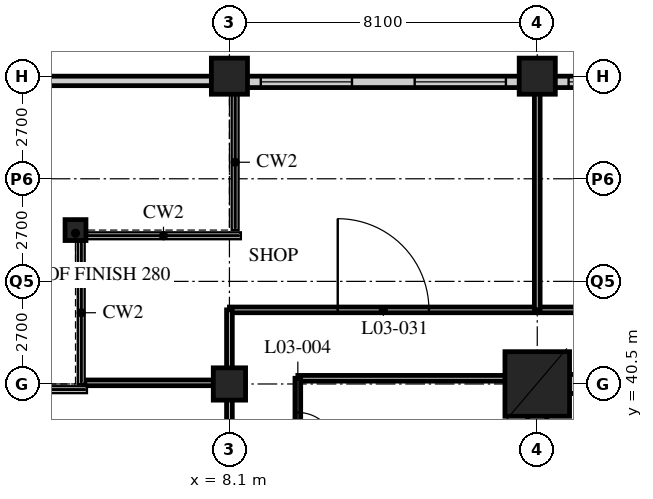
"""IFC4 building model, lengths in metres.
Left out: names, types, materials, properties, quantities, classifications, styles, units other than length and angle.
Written with IfcOpenShell. Run it as: python <this file> out.ifc"""

import sys

from ifc_helpers import new_model, si_unit, direction, frame, frame_2d, origin, origin_2d, place, context, subcontext, project, spatial, rectangle, hollow_rectangle, extrude, element, fill, save


model = new_model("IFC4")
c1 = context("Model", 3, precision=1e-05, world=origin(), true_north=direction((0.0, 1.0)))
c2 = subcontext(c1, "Body", "Model", "MODEL_VIEW")
j1 = project(units=[si_unit("LENGTHUNIT", "METRE"), si_unit("PLANEANGLEUNIT", "RADIAN")], contexts=[c1])
p1 = place(None, origin())
s1 = spatial("IfcSite", under=j1, at=p1, CompositionType="ELEMENT")
p2 = place(p1, origin())
s2 = spatial("IfcBuilding", under=s1, at=p2, CompositionType="ELEMENT")
p3 = place(p2, frame((0.0, 0.0, 16.8)))
s3 = spatial("IfcBuildingStorey", under=s2, at=p3, CompositionType="ELEMENT", Elevation=16.8)
p4 = place(p3, frame((4.05, 44.55, 0.0), z_axis=(0.0, 0.0, 1.0), x_axis=(1.0, 0.0, 0.0)))
e1 = element("IfcColumn", 1, at=p4, inside=s3, PredefinedType="COLUMN", context=c2, shape_type="SweptSolid", body=[
    extrude(hollow_rectangle(XDim=0.55, YDim=0.55, WallThickness=0.05, at=origin_2d()), origin(), (0.0, 0.0, 1.0), 5.4),
])
p5 = place(p3, frame((8.1, 40.5, 0.0), z_axis=(0.0, 0.0, 1.0), x_axis=(1.0, 0.0, 0.0)))
e2 = element("IfcColumn", 2, at=p5, inside=s3, PredefinedType="COLUMN", context=c2, shape_type="SweptSolid", body=[
    extrude(hollow_rectangle(XDim=0.85, YDim=0.85, WallThickness=0.085, at=origin_2d()), origin(), (0.0, 0.0, 1.0), 5.4),
])
p6 = place(p3, frame((8.1, 48.6, 0.0), z_axis=(0.0, 0.0, 1.0), x_axis=(1.0, 0.0, 0.0)))
e3 = element("IfcColumn", 3, at=p6, inside=s3, PredefinedType="COLUMN", context=c2, shape_type="SweptSolid", body=[
    extrude(hollow_rectangle(XDim=0.95, YDim=0.95, WallThickness=0.1, at=origin_2d()), origin(), (0.0, 0.0, 1.0), 5.4),
])
p7 = place(p3, frame((16.2, 40.5, 0.0), z_axis=(0.0, 0.0, 1.0), x_axis=(1.0, 0.0, 0.0)))
e4 = element("IfcColumn", 4, at=p7, inside=s3, PredefinedType="COLUMN", context=c2, shape_type="SweptSolid", body=[
    extrude(hollow_rectangle(XDim=1.7, YDim=1.7, WallThickness=0.16, at=origin_2d()), origin(), (0.0, 0.0, 1.0), 5.4),
])
p8 = place(p3, frame((16.2, 48.6, 0.0), z_axis=(0.0, 0.0, 1.0), x_axis=(1.0, 0.0, 0.0)))
e5 = element("IfcColumn", 5, at=p8, inside=s3, PredefinedType="COLUMN", context=c2, shape_type="SweptSolid", body=[
    extrude(hollow_rectangle(XDim=0.95, YDim=0.95, WallThickness=0.1, at=origin_2d()), origin(), (0.0, 0.0, 1.0), 5.4),
])
p9 = place(p3, frame((64.5, 48.45, 0.0), z_axis=(0.0, 0.0, 1.0), x_axis=(-1.0, 0.0, 0.0)))
e6 = element("IfcWall", 6, at=p9, inside=s3, PredefinedType="SOLIDWALL", context=c2, shape_type="SweptSolid", body=[
    extrude(rectangle(XDim=56.4, YDim=0.3, at=frame_2d((28.2, 0.0))), origin(), (0.0, 0.0, 1.0), 5.15),
])
p10 = place(p9, frame((0.525, 0.0, 1.0)))
e7 = element("IfcOpeningElement", 7, at=p10, cuts=e6, PredefinedType="OPENING", context=c2, shape_type="SweptSolid", body=[
    extrude(rectangle(XDim=2.4, YDim=2.75, at=frame_2d((1.2, 1.375))), frame((0.0, 0.16, 0.0), z_axis=(0.0, -1.0, 0.0), x_axis=(1.0, 0.0, 0.0)), (0.0, 0.0, 1.0), 0.32),
])
p11 = place(p9, frame((4.575, 0.0, 1.0)))
e8 = element("IfcOpeningElement", 8, at=p11, cuts=e6, PredefinedType="OPENING", context=c2, shape_type="SweptSolid", body=[
    extrude(rectangle(XDim=2.4, YDim=2.75, at=frame_2d((1.2, 1.375))), frame((0.0, 0.16, 0.0), z_axis=(0.0, -1.0, 0.0), x_axis=(1.0, 0.0, 0.0)), (0.0, 0.0, 1.0), 0.32),
])
p12 = place(p9, frame((8.625, 0.0, 1.0)))
e9 = element("IfcOpeningElement", 9, at=p12, cuts=e6, PredefinedType="OPENING", context=c2, shape_type="SweptSolid", body=[
    extrude(rectangle(XDim=2.4, YDim=2.75, at=frame_2d((1.2, 1.375))), frame((0.0, 0.16, 0.0), z_axis=(0.0, -1.0, 0.0), x_axis=(1.0, 0.0, 0.0)), (0.0, 0.0, 1.0), 0.32),
])
p13 = place(p9, frame((12.675, 0.0, 1.0)))
e10 = element("IfcOpeningElement", 10, at=p13, cuts=e6, PredefinedType="OPENING", context=c2, shape_type="SweptSolid", body=[
    extrude(rectangle(XDim=2.4, YDim=2.75, at=frame_2d((1.2, 1.375))), frame((0.0, 0.16, 0.0), z_axis=(0.0, -1.0, 0.0), x_axis=(1.0, 0.0, 0.0)), (0.0, 0.0, 1.0), 0.32),
])
p14 = place(p9, frame((16.725, 0.0, 1.0)))
e11 = element("IfcOpeningElement", 11, at=p14, cuts=e6, PredefinedType="OPENING", context=c2, shape_type="SweptSolid", body=[
    extrude(rectangle(XDim=2.4, YDim=2.75, at=frame_2d((1.2, 1.375))), frame((0.0, 0.16, 0.0), z_axis=(0.0, -1.0, 0.0), x_axis=(1.0, 0.0, 0.0)), (0.0, 0.0, 1.0), 0.32),
])
p15 = place(p9, frame((20.775, 0.0, 1.0)))
e12 = element("IfcOpeningElement", 12, at=p15, cuts=e6, PredefinedType="OPENING", context=c2, shape_type="SweptSolid", body=[
    extrude(rectangle(XDim=2.4, YDim=2.75, at=frame_2d((1.2, 1.375))), frame((0.0, 0.16, 0.0), z_axis=(0.0, -1.0, 0.0), x_axis=(1.0, 0.0, 0.0)), (0.0, 0.0, 1.0), 0.32),
])
p16 = place(p9, frame((24.825, 0.0, 1.0)))
e13 = element("IfcOpeningElement", 13, at=p16, cuts=e6, PredefinedType="OPENING", context=c2, shape_type="SweptSolid", body=[
    extrude(rectangle(XDim=2.4, YDim=2.75, at=frame_2d((1.2, 1.375))), frame((0.0, 0.16, 0.0), z_axis=(0.0, -1.0, 0.0), x_axis=(1.0, 0.0, 0.0)), (0.0, 0.0, 1.0), 0.32),
])
p17 = place(p9, frame((28.875, 0.0, 1.0)))
e14 = element("IfcOpeningElement", 14, at=p17, cuts=e6, PredefinedType="OPENING", context=c2, shape_type="SweptSolid", body=[
    extrude(rectangle(XDim=2.4, YDim=2.75, at=frame_2d((1.2, 1.375))), frame((0.0, 0.16, 0.0), z_axis=(0.0, -1.0, 0.0), x_axis=(1.0, 0.0, 0.0)), (0.0, 0.0, 1.0), 0.32),
])
p18 = place(p9, frame((32.925, 0.0, 1.0)))
e15 = element("IfcOpeningElement", 15, at=p18, cuts=e6, PredefinedType="OPENING", context=c2, shape_type="SweptSolid", body=[
    extrude(rectangle(XDim=2.4, YDim=2.75, at=frame_2d((1.2, 1.375))), frame((0.0, 0.16, 0.0), z_axis=(0.0, -1.0, 0.0), x_axis=(1.0, 0.0, 0.0)), (0.0, 0.0, 1.0), 0.32),
])
p19 = place(p9, frame((36.975, 0.0, 1.0)))
e16 = element("IfcOpeningElement", 16, at=p19, cuts=e6, PredefinedType="OPENING", context=c2, shape_type="SweptSolid", body=[
    extrude(rectangle(XDim=2.4, YDim=2.75, at=frame_2d((1.2, 1.375))), frame((0.0, 0.16, 0.0), z_axis=(0.0, -1.0, 0.0), x_axis=(1.0, 0.0, 0.0)), (0.0, 0.0, 1.0), 0.32),
])
p20 = place(p9, frame((41.025, 0.0, 1.0)))
e17 = element("IfcOpeningElement", 17, at=p20, cuts=e6, PredefinedType="OPENING", context=c2, shape_type="SweptSolid", body=[
    extrude(rectangle(XDim=2.4, YDim=2.75, at=frame_2d((1.2, 1.375))), frame((0.0, 0.16, 0.0), z_axis=(0.0, -1.0, 0.0), x_axis=(1.0, 0.0, 0.0)), (0.0, 0.0, 1.0), 0.32),
])
p21 = place(p9, frame((45.075, 0.0, 1.0)))
e18 = element("IfcOpeningElement", 18, at=p21, cuts=e6, PredefinedType="OPENING", context=c2, shape_type="SweptSolid", body=[
    extrude(rectangle(XDim=2.4, YDim=2.75, at=frame_2d((1.2, 1.375))), frame((0.0, 0.16, 0.0), z_axis=(0.0, -1.0, 0.0), x_axis=(1.0, 0.0, 0.0)), (0.0, 0.0, 1.0), 0.32),
])
p22 = place(p9, frame((49.125, 0.0, 1.0)))
e19 = element("IfcOpeningElement", 19, at=p22, cuts=e6, PredefinedType="OPENING", context=c2, shape_type="SweptSolid", body=[
    extrude(rectangle(XDim=2.4, YDim=2.75, at=frame_2d((1.2, 1.375))), frame((0.0, 0.16, 0.0), z_axis=(0.0, -1.0, 0.0), x_axis=(1.0, 0.0, 0.0)), (0.0, 0.0, 1.0), 0.32),
])
p23 = place(p9, frame((53.175, 0.0, 1.0)))
e20 = element("IfcOpeningElement", 20, at=p23, cuts=e6, PredefinedType="OPENING", context=c2, shape_type="SweptSolid", body=[
    extrude(rectangle(XDim=2.4, YDim=2.75, at=frame_2d((1.2, 1.375))), frame((0.0, 0.16, 0.0), z_axis=(0.0, -1.0, 0.0), x_axis=(1.0, 0.0, 0.0)), (0.0, 0.0, 1.0), 0.32),
])
p24 = place(p3, frame((8.1, 48.475, 0.0), z_axis=(0.0, 0.0, 1.0), x_axis=(-1.0, 0.0, 0.0)))
e21 = element("IfcWall", 21, at=p24, inside=s3, PredefinedType="PARAPET", context=c2, shape_type="SweptSolid", body=[
    extrude(rectangle(XDim=16.2, YDim=0.25, at=frame_2d((8.1, 0.0))), origin(), (0.0, 0.0, 1.0), 1.38),
])
p25 = place(p3, frame((8.1, 42.45, 0.0), z_axis=(0.0, 0.0, 1.0), x_axis=(1.0, 0.0, 0.0)))
e22 = element("IfcWall", 22, at=p25, inside=s3, PredefinedType="PARTITIONING", context=c2, shape_type="SweptSolid", body=[
    extrude(rectangle(XDim=48.6, YDim=0.15, at=frame_2d((24.3, 0.0))), origin(), (0.0, 0.0, 1.0), 5.15),
])
p26 = place(p25, frame((10.95, 0.0, 0.0)))
e23 = element("IfcOpeningElement", 23, at=p26, cuts=e22, PredefinedType="OPENING", context=c2, shape_type="SweptSolid", body=[
    extrude(rectangle(XDim=2.4, YDim=2.7, at=frame_2d((1.2, 1.35))), frame((0.0, 0.085, 0.0), z_axis=(0.0, -1.0, 0.0), x_axis=(1.0, 0.0, 0.0)), (0.0, 0.0, 1.0), 0.17),
])
p27 = place(p25, frame((19.05, 0.0, 0.0)))
e24 = element("IfcOpeningElement", 24, at=p27, cuts=e22, PredefinedType="OPENING", context=c2, shape_type="SweptSolid", body=[
    extrude(rectangle(XDim=2.4, YDim=2.7, at=frame_2d((1.2, 1.35))), frame((0.0, 0.085, 0.0), z_axis=(0.0, -1.0, 0.0), x_axis=(1.0, 0.0, 0.0)), (0.0, 0.0, 1.0), 0.17),
])
p28 = place(p25, frame((27.15, 0.0, 0.0)))
e25 = element("IfcOpeningElement", 25, at=p28, cuts=e22, PredefinedType="OPENING", context=c2, shape_type="SweptSolid", body=[
    extrude(rectangle(XDim=2.4, YDim=2.7, at=frame_2d((1.2, 1.35))), frame((0.0, 0.085, 0.0), z_axis=(0.0, -1.0, 0.0), x_axis=(1.0, 0.0, 0.0)), (0.0, 0.0, 1.0), 0.17),
])
p29 = place(p25, frame((35.25, 0.0, 0.0)))
e26 = element("IfcOpeningElement", 26, at=p29, cuts=e22, PredefinedType="OPENING", context=c2, shape_type="SweptSolid", body=[
    extrude(rectangle(XDim=2.4, YDim=2.7, at=frame_2d((1.2, 1.35))), frame((0.0, 0.085, 0.0), z_axis=(0.0, -1.0, 0.0), x_axis=(1.0, 0.0, 0.0)), (0.0, 0.0, 1.0), 0.17),
])
p30 = place(p25, frame((43.35, 0.0, 0.0)))
e27 = element("IfcOpeningElement", 27, at=p30, cuts=e22, PredefinedType="OPENING", context=c2, shape_type="SweptSolid", body=[
    extrude(rectangle(XDim=2.4, YDim=2.7, at=frame_2d((1.2, 1.35))), frame((0.0, 0.085, 0.0), z_axis=(0.0, -1.0, 0.0), x_axis=(1.0, 0.0, 0.0)), (0.0, 0.0, 1.0), 0.17),
])
p31 = place(p25, frame((2.85, 0.0, 0.0)))
e28 = element("IfcOpeningElement", 28, at=p31, cuts=e22, PredefinedType="OPENING", context=c2, shape_type="SweptSolid", body=[
    extrude(rectangle(XDim=2.4, YDim=2.7, at=frame_2d((1.2, 1.35))), frame((0.0, 0.085, 0.0), z_axis=(0.0, -1.0, 0.0), x_axis=(1.0, 0.0, 0.0)), (0.0, 0.0, 1.0), 0.17),
])
p32 = place(p3, frame((8.1, 8.1, 0.0), z_axis=(0.0, 0.0, 1.0), x_axis=(0.0, 1.0, 0.0)))
e29 = element("IfcWall", 29, at=p32, inside=s3, PredefinedType="PARTITIONING", context=c2, shape_type="SweptSolid", body=[
    extrude(rectangle(XDim=34.35, YDim=0.15, at=frame_2d((17.175, 0.0))), origin(), (0.0, 0.0, 1.0), 4.538),
])
p33 = place(p32, frame((8.95, 0.0, 0.0)))
e30 = element("IfcOpeningElement", 30, at=p33, cuts=e29, PredefinedType="OPENING", context=c2, shape_type="SweptSolid", body=[
    extrude(rectangle(XDim=1.8, YDim=2.4, at=frame_2d((0.9, 1.2))), frame((0.0, 0.085, 0.0), z_axis=(0.0, -1.0, 0.0), x_axis=(1.0, 0.0, 0.0)), (0.0, 0.0, 1.0), 0.17),
])
p34 = place(p32, frame((19.35, 0.0, 0.0)))
e31 = element("IfcOpeningElement", 31, at=p34, cuts=e29, PredefinedType="OPENING", context=c2, shape_type="SweptSolid", body=[
    extrude(rectangle(XDim=1.8, YDim=2.4, at=frame_2d((0.9, 1.2))), frame((0.0, 0.085, 0.0), z_axis=(0.0, -1.0, 0.0), x_axis=(1.0, 0.0, 0.0)), (0.0, 0.0, 1.0), 0.17),
])
p35 = place(p32, frame((27.15, 0.0, 0.0)))
e32 = element("IfcOpeningElement", 32, at=p35, cuts=e29, PredefinedType="OPENING", context=c2, shape_type="SweptSolid", body=[
    extrude(rectangle(XDim=2.4, YDim=2.7, at=frame_2d((1.2, 1.35))), frame((0.0, 0.085, 0.0), z_axis=(0.0, -1.0, 0.0), x_axis=(1.0, 0.0, 0.0)), (0.0, 0.0, 1.0), 0.17),
])
p36 = place(p3, frame((16.068, 40.65, 0.0), z_axis=(0.0, 0.0, 1.0), x_axis=(-1.0, 0.0, 0.0)))
e33 = element("IfcWall", 33, at=p36, inside=s3, PredefinedType="PARTITIONING", context=c2, shape_type="SweptSolid", body=[
    extrude(rectangle(XDim=6.168, YDim=0.15, at=frame_2d((3.084, 0.0))), origin(), (0.0, 0.0, 1.0), 4.538),
])
p37 = place(p3, frame((9.9, 40.65, 0.0), z_axis=(0.0, 0.0, 1.0), x_axis=(0.0, -1.0, 0.0)))
e34 = element("IfcWall", 34, at=p37, inside=s3, PredefinedType="PARTITIONING", context=c2, shape_type="SweptSolid", body=[
    extrude(rectangle(XDim=30.75, YDim=0.15, at=frame_2d((15.375, 0.0))), origin(), (0.0, 0.0, 1.0), 5.15),
])
p38 = place(p37, frame((13.525, 0.0, 0.0)))
e35 = element("IfcOpeningElement", 35, at=p38, cuts=e34, PredefinedType="OPENING", context=c2, shape_type="SweptSolid", body=[
    extrude(rectangle(XDim=0.85, YDim=2.1, at=frame_2d((0.425, 1.05))), frame((0.0, 0.085, 0.0), z_axis=(0.0, -1.0, 0.0), x_axis=(1.0, 0.0, 0.0)), (0.0, 0.0, 1.0), 0.17),
])
p39 = place(p37, frame((9.4, 0.0, 0.0)))
e36 = element("IfcOpeningElement", 36, at=p39, cuts=e34, PredefinedType="OPENING", context=c2, shape_type="SweptSolid", body=[
    extrude(rectangle(XDim=1.0, YDim=2.1, at=frame_2d((0.5, 1.05))), frame((0.0, 0.085, 0.0), z_axis=(0.0, -1.0, 0.0), x_axis=(1.0, 0.0, 0.0)), (0.0, 0.0, 1.0), 0.17),
])
p40 = place(p37, frame((5.025, 0.0, 0.0)))
e37 = element("IfcOpeningElement", 37, at=p40, cuts=e34, PredefinedType="OPENING", context=c2, shape_type="SweptSolid", body=[
    extrude(rectangle(XDim=0.85, YDim=2.1, at=frame_2d((0.425, 1.05))), frame((0.0, 0.085, 0.0), z_axis=(0.0, -1.0, 0.0), x_axis=(1.0, 0.0, 0.0)), (0.0, 0.0, 1.0), 0.17),
])
p41 = place(p37, frame((0.9, 0.0, 0.0)))
e38 = element("IfcOpeningElement", 38, at=p41, cuts=e34, PredefinedType="OPENING", context=c2, shape_type="SweptSolid", body=[
    extrude(rectangle(XDim=1.0, YDim=2.1, at=frame_2d((0.5, 1.05))), frame((0.0, 0.085, 0.0), z_axis=(0.0, -1.0, 0.0), x_axis=(1.0, 0.0, 0.0)), (0.0, 0.0, 1.0), 0.17),
])
p42 = place(p3, frame((4.293, 40.53, 0.0), z_axis=(0.0, 0.0, 1.0), x_axis=(1.0, 0.0, 0.0)))
e39 = element("IfcWall", 39, at=p42, inside=s3, PredefinedType="PARTITIONING", context=c2, shape_type="SweptSolid", body=[
    extrude(rectangle(XDim=3.807, YDim=0.15, at=frame_2d((1.904, 0.0))), origin(), (0.0, 0.0, 1.0), 4.538),
])
p43 = place(p3, frame((16.2, 42.45, 0.0), z_axis=(0.0, 0.0, 1.0), x_axis=(0.0, 1.0, 0.0)))
e40 = element("IfcWall", 40, at=p43, inside=s3, PredefinedType="PARTITIONING", context=c2, shape_type="SweptSolid", body=[
    extrude(rectangle(XDim=5.85, YDim=0.15, at=frame_2d((2.925, 0.0))), origin(), (0.0, 0.0, 1.0), 4.538),
])
p44 = place(p3, frame((15.95, 40.5, 0.0), z_axis=(0.0, 0.0, 1.0), x_axis=(1.0, 0.0, 0.0)))
e41 = element("IfcWall", 41, at=p44, inside=s3, PredefinedType="SOLIDWALL", context=c2, shape_type="SweptSolid", body=[
    extrude(rectangle(XDim=24.8, YDim=0.5, at=frame_2d((12.4, 0.0))), origin(), (0.0, 0.0, 1.0), 4.5),
])
p45 = place(p44, frame((11.5, 0.0, 0.0)))
e42 = element("IfcOpeningElement", 42, at=p45, cuts=e41, PredefinedType="OPENING", context=c2, shape_type="SweptSolid", body=[
    extrude(rectangle(XDim=1.8, YDim=2.4, at=frame_2d((0.9, 1.2))), frame((0.0, 0.26, 0.0), z_axis=(0.0, -1.0, 0.0), x_axis=(1.0, 0.0, 0.0)), (0.0, 0.0, 1.0), 0.52),
])
p46 = place(p3, frame((16.2, 24.55, 0.0), z_axis=(0.0, 0.0, 1.0), x_axis=(0.0, 1.0, 0.0)))
e43 = element("IfcWall", 43, at=p46, inside=s3, PredefinedType="SOLIDWALL", context=c2, shape_type="SweptSolid", body=[
    extrude(rectangle(XDim=15.7, YDim=0.5, at=frame_2d((7.85, 0.0))), origin(), (0.0, 0.0, 1.0), 4.538),
])
p47 = place(p21, origin())
e44 = element("IfcWindow", 44, at=p47, inside=s3, PartitioningType="SINGLE_PANEL", PredefinedType="WINDOW", context=c2, shape_type="SweptSolid", body=[
    extrude(rectangle(XDim=2.4, YDim=2.75, at=frame_2d((1.2, 1.375))), frame((0.0, 0.03, 0.0), z_axis=(0.0, -1.0, 0.0), x_axis=(1.0, 0.0, 0.0)), (0.0, 0.0, 1.0), 0.06),
])
fill(e18, e44)
p48 = place(p22, origin())
e45 = element("IfcWindow", 45, at=p48, inside=s3, PartitioningType="SINGLE_PANEL", PredefinedType="WINDOW", context=c2, shape_type="SweptSolid", body=[
    extrude(rectangle(XDim=2.4, YDim=2.75, at=frame_2d((1.2, 1.375))), frame((0.0, 0.03, 0.0), z_axis=(0.0, -1.0, 0.0), x_axis=(1.0, 0.0, 0.0)), (0.0, 0.0, 1.0), 0.06),
])
fill(e19, e45)
p49 = place(p23, origin())
e46 = element("IfcWindow", 46, at=p49, inside=s3, PartitioningType="SINGLE_PANEL", PredefinedType="WINDOW", context=c2, shape_type="SweptSolid", body=[
    extrude(rectangle(XDim=2.4, YDim=2.75, at=frame_2d((1.2, 1.375))), frame((0.0, 0.03, 0.0), z_axis=(0.0, -1.0, 0.0), x_axis=(1.0, 0.0, 0.0)), (0.0, 0.0, 1.0), 0.06),
])
fill(e20, e46)
p50 = place(p41, origin())
e47 = element("IfcDoor", 47, at=p50, inside=s3, OperationType="SINGLE_SWING_RIGHT", PredefinedType="DOOR", context=c2, shape_type="SweptSolid", body=[
    extrude(rectangle(XDim=1.0, YDim=2.1, at=frame_2d((0.5, 1.05))), frame((0.0, 0.025, 0.0), z_axis=(0.0, -1.0, 0.0), x_axis=(1.0, 0.0, 0.0)), (0.0, 0.0, 1.0), 0.05),
])
fill(e38, e47)
p51 = place(p31, origin())
e48 = element("IfcDoor", 48, at=p51, inside=s3, OperationType="DOUBLE_DOOR_SINGLE_SWING", PredefinedType="DOOR", context=c2, shape_type="SweptSolid", body=[
    extrude(rectangle(XDim=2.4, YDim=2.7, at=frame_2d((1.2, 1.35))), frame((0.0, 0.025, 0.0), z_axis=(0.0, -1.0, 0.0), x_axis=(1.0, 0.0, 0.0)), (0.0, 0.0, 1.0), 0.05),
])
fill(e28, e48)
save(model, sys.argv[1])
